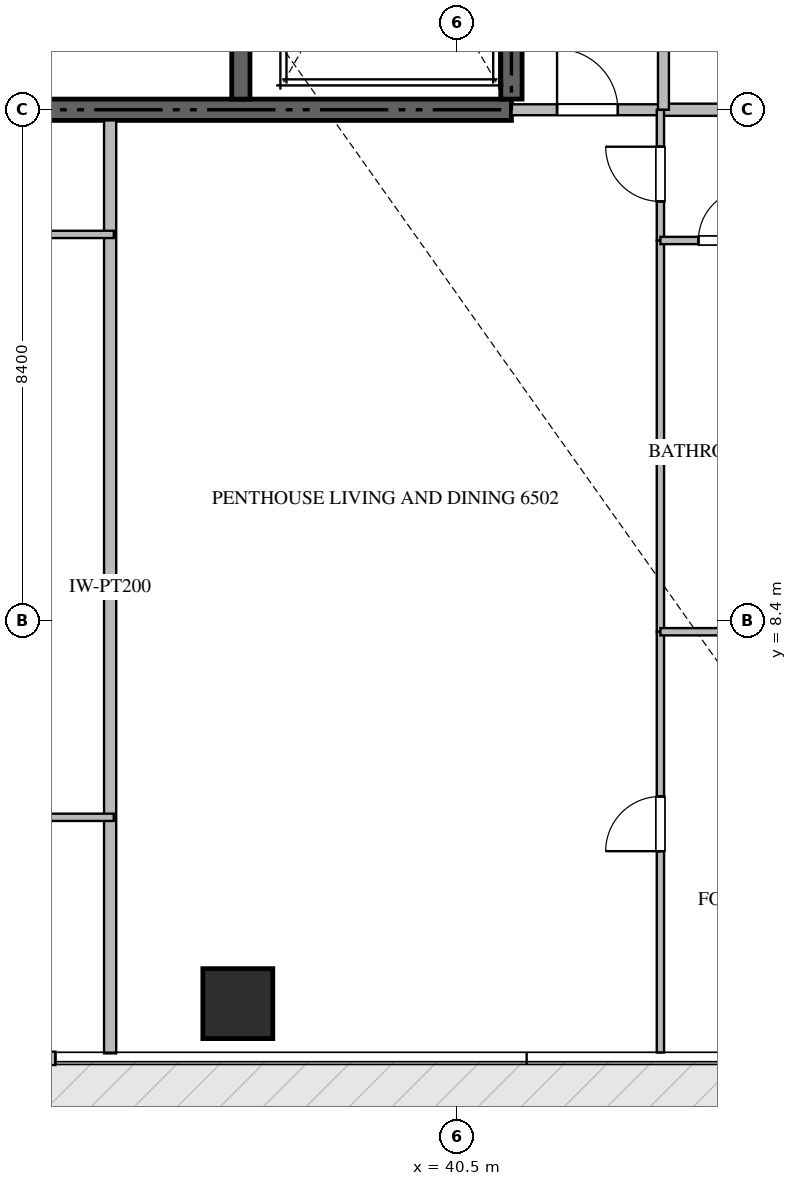
"""IFC4 building model, lengths in metres.
Left out: names, types, materials, properties, quantities, classifications, styles, units other than length and angle.
Written with IfcOpenShell. Run it as: python <this file> out.ifc"""

import sys

from ifc_helpers import new_model, si_unit, direction, frame, frame_2d, origin, origin_2d, place, context, subcontext, project, spatial, rectangle, extrude, source, transform, mapped, element, fill, save


model = new_model("IFC4")
c1 = context("Model", 3, precision=1e-05, world=origin(), true_north=direction((0.0, 1.0)))
c2 = subcontext(c1, "Body", "Model", "MODEL_VIEW")
j1 = project(units=[si_unit("LENGTHUNIT", "METRE"), si_unit("PLANEANGLEUNIT", "RADIAN")], contexts=[c1])
p1 = place(None, origin())
s1 = spatial("IfcSite", under=j1, at=p1, CompositionType="ELEMENT")
p2 = place(p1, origin())
s2 = spatial("IfcBuilding", under=s1, at=p2, CompositionType="ELEMENT")
p3 = place(p2, frame((0.0, 0.0, 260.5)))
s3 = spatial("IfcBuildingStorey", under=s2, at=p3, CompositionType="ELEMENT", Elevation=260.5)
p4 = place(p3, frame((23.4, 16.8, -0.26), z_axis=(0.0, 0.0, 1.0), x_axis=(1.0, 0.0, 0.0)))
e1 = element("IfcWall", 1, at=p4, inside=s3, PredefinedType="SHEAR", context=c2, shape_type="SweptSolid", body=[
    extrude(rectangle(XDim=18.0, YDim=0.35, at=frame_2d((9.0, 0.0))), origin(), (0.0, 0.0, 1.0), 3.848),
])
p5 = place(p3, frame((41.4, 16.975, -0.26), z_axis=(0.0, 0.0, 1.0), x_axis=(0.0, 1.0, 0.0)))
e2 = element("IfcWall", 2, at=p5, inside=s3, PredefinedType="SHEAR", context=c2, shape_type="SweptSolid", body=[
    extrude(rectangle(XDim=8.375, YDim=0.35, at=frame_2d((4.188, 0.0))), origin(), (0.0, 0.0, 1.0), 3.848),
])
p6 = place(p3, frame((36.95, 16.975, -0.26), z_axis=(0.0, 0.0, 1.0), x_axis=(0.0, 1.0, 0.0)))
e3 = element("IfcWall", 3, at=p6, inside=s3, PredefinedType="SHEAR", context=c2, shape_type="SweptSolid", body=[
    extrude(rectangle(XDim=8.375, YDim=0.3, at=frame_2d((4.188, 0.0))), origin(), (0.0, 0.0, 1.0), 3.848),
])
m1 = source(origin(), c2, "Body", "SweptSolid", [
    extrude(rectangle(XDim=1.15, YDim=1.15, at=origin_2d()), origin(), (0.0, 0.0, 1.0), 3.85),
])
p7 = place(p3, frame((36.9, 2.1, -0.26), z_axis=(0.0, 0.0, 1.0), x_axis=(1.0, 0.0, 0.0)))
e4 = element("IfcColumn", 4, at=p7, inside=s3, PredefinedType="COLUMN", context=c2, shape_type="MappedRepresentation", body=[
    mapped(m1, transform((0.0, 0.0, 0.0), scale=1.0)),
])
p8 = place(p3, frame((30.9, 1.2, 0.0), z_axis=(0.0, 0.0, 1.0), x_axis=(1.0, 0.0, 0.0)))
e5 = element("IfcWall", 5, at=p8, inside=s3, PredefinedType="ELEMENTEDWALL", context=c2, shape_type="SweptSolid", body=[
    extrude(rectangle(XDim=3.0, YDim=0.22, at=frame_2d((1.5, 0.0))), origin(), (0.0, 0.0, 1.0), 3.575),
])
p9 = place(p8, frame((0.8, 0.0, 0.0)))
e6 = element("IfcOpeningElement", 6, at=p9, cuts=e5, PredefinedType="OPENING", context=c2, shape_type="SweptSolid", body=[
    extrude(rectangle(XDim=1.4, YDim=2.25, at=frame_2d((0.7, 1.125))), frame((0.0, 0.12, 0.0), z_axis=(0.0, -1.0, 0.0), x_axis=(1.0, 0.0, 0.0)), (0.0, 0.0, 1.0), 0.24),
])
p10 = place(p3, frame((34.8, 1.282, 0.0), z_axis=(0.0, 0.0, 1.0), x_axis=(0.0, 1.0, 0.0)))
e7 = element("IfcWall", 7, at=p10, inside=s3, PredefinedType="PARTITIONING", context=c2, shape_type="SweptSolid", body=[
    extrude(rectangle(XDim=15.343, YDim=0.2, at=frame_2d((7.671, 0.0))), origin(), (0.0, 0.0, 1.0), 3.59),
])
p11 = place(p3, frame((43.9, 16.8, 0.0), z_axis=(0.0, 0.0, 1.0), x_axis=(1.0, 0.0, 0.0)))
e8 = element("IfcWall", 8, at=p11, inside=s3, PredefinedType="PARTITIONING", context=c2, shape_type="SweptSolid", body=[
    extrude(rectangle(XDim=13.418, YDim=0.2, at=frame_2d((6.709, 0.0))), origin(), (0.0, 0.0, 1.0), 3.59),
])
p12 = place(p3, frame((41.402, 16.8, 0.0), z_axis=(0.0, 0.0, 1.0), x_axis=(1.0, 0.0, 0.0)))
e9 = element("IfcWall", 9, at=p12, inside=s3, PredefinedType="PARTITIONING", context=c2, shape_type="SweptSolid", body=[
    extrude(rectangle(XDim=2.496, YDim=0.18, at=frame_2d((1.248, 0.0))), origin(), (0.0, 0.0, 1.0), 3.59),
])
p13 = place(p12, frame((0.748, 0.0, 0.0)))
e10 = element("IfcOpeningElement", 10, at=p13, cuts=e9, PredefinedType="OPENING", context=c2, shape_type="SweptSolid", body=[
    extrude(rectangle(XDim=1.0, YDim=2.15, at=frame_2d((0.5, 1.075))), frame((0.0, 0.1, 0.0), z_axis=(0.0, -1.0, 0.0), x_axis=(1.0, 0.0, 0.0)), (0.0, 0.0, 1.0), 0.2),
])
p14 = place(p3, frame((43.9, 16.8, 0.0), z_axis=(0.0, 0.0, 1.0), x_axis=(0.0, 1.0, 0.0)))
e11 = element("IfcWall", 11, at=p14, inside=s3, PredefinedType="PARTITIONING", context=c2, shape_type="SweptSolid", body=[
    extrude(rectangle(XDim=16.8, YDim=0.18, at=frame_2d((8.4, 0.0))), origin(), (0.0, 0.0, 1.0), 3.59),
])
p15 = place(p14, frame((2.575, 0.0, 0.0)))
e12 = element("IfcOpeningElement", 12, at=p15, cuts=e11, PredefinedType="OPENING", context=c2, shape_type="SweptSolid", body=[
    extrude(rectangle(XDim=1.0, YDim=2.15, at=frame_2d((0.5, 1.075))), frame((0.0, 0.1, 0.0), z_axis=(0.0, -1.0, 0.0), x_axis=(1.0, 0.0, 0.0)), (0.0, 0.0, 1.0), 0.2),
])
p16 = place(p14, frame((10.997, 0.0, 0.0)))
e13 = element("IfcOpeningElement", 13, at=p16, cuts=e11, PredefinedType="OPENING", context=c2, shape_type="SweptSolid", body=[
    extrude(rectangle(XDim=1.0, YDim=2.15, at=frame_2d((0.5, 1.075))), frame((0.0, 0.1, 0.0), z_axis=(0.0, -1.0, 0.0), x_axis=(1.0, 0.0, 0.0)), (0.0, 0.0, 1.0), 0.2),
])
for number, where, z_axis, x_axis in (
    (14, (26.3, 5.164, 0.0), (0.0, 0.0, 1.0), (1.0, 0.0, 0.0)),
    (15, (26.3, 14.75, 0.0), (0.0, 0.0, 1.0), (1.0, 0.0, 0.0)),
):
    element("IfcWall", number, at=place(p3, frame(where, z_axis=z_axis, x_axis=x_axis)), inside=s3, PredefinedType="PARTITIONING", context=c2, shape_type="SweptSolid", body=[
        extrude(rectangle(XDim=8.56, YDim=0.12, at=frame_2d((4.28, 0.0))), origin(), (0.0, 0.0, 1.0), 3.59),
    ])
p17 = place(p3, frame((43.85, 14.65, 0.0), z_axis=(0.0, 0.0, 1.0), x_axis=(0.0, 1.0, 0.0)))
e16 = element("IfcWall", 16, at=p17, inside=s3, PredefinedType="PARTITIONING", context=c2, shape_type="SweptSolid", body=[
    extrude(rectangle(XDim=2.148, YDim=0.12, at=frame_2d((1.074, 0.0))), origin(), (0.0, 0.0, 1.0), 3.59),
])
p18 = place(p17, frame((0.642, 0.0, 0.0)))
e17 = element("IfcOpeningElement", 17, at=p18, cuts=e16, PredefinedType="OPENING", context=c2, shape_type="SweptSolid", body=[
    extrude(rectangle(XDim=0.9, YDim=2.1, at=frame_2d((0.45, 1.05))), frame((0.0, 0.07, 0.0), z_axis=(0.0, -1.0, 0.0), x_axis=(1.0, 0.0, 0.0)), (0.0, 0.0, 1.0), 0.14),
])
p19 = place(p3, frame((43.85, 1.295, 0.0), z_axis=(0.0, 0.0, 1.0), x_axis=(0.0, 1.0, 0.0)))
e18 = element("IfcWall", 18, at=p19, inside=s3, PredefinedType="PARTITIONING", context=c2, shape_type="SweptSolid", body=[
    extrude(rectangle(XDim=6.921, YDim=0.12, at=frame_2d((3.46, 0.0))), origin(), (0.0, 0.0, 1.0), 3.59),
])
p20 = place(p19, frame((3.312, 0.0, 0.0)))
e19 = element("IfcOpeningElement", 19, at=p20, cuts=e18, PredefinedType="OPENING", context=c2, shape_type="SweptSolid", body=[
    extrude(rectangle(XDim=0.9, YDim=2.1, at=frame_2d((0.45, 1.05))), frame((0.0, 0.07, 0.0), z_axis=(0.0, -1.0, 0.0), x_axis=(1.0, 0.0, 0.0)), (0.0, 0.0, 1.0), 0.14),
])
p21 = place(p3, frame((43.85, 8.218, 0.0), z_axis=(0.0, 0.0, 1.0), x_axis=(0.0, 1.0, 0.0)))
e20 = element("IfcWall", 20, at=p21, inside=s3, PredefinedType="PARTITIONING", context=c2, shape_type="SweptSolid", body=[
    extrude(rectangle(XDim=6.43, YDim=0.12, at=frame_2d((3.215, 0.0))), origin(), (0.0, 0.0, 1.0), 3.59),
])
p22 = place(p3, frame((43.85, 8.216, 0.0), z_axis=(0.0, 0.0, 1.0), x_axis=(1.0, 0.0, 0.0)))
e21 = element("IfcWall", 21, at=p22, inside=s3, PredefinedType="PARTITIONING", context=c2, shape_type="SweptSolid", body=[
    extrude(rectangle(XDim=5.1, YDim=0.12, at=frame_2d((2.55, 0.0))), origin(), (0.0, 0.0, 1.0), 3.59),
])
p23 = place(p3, frame((43.85, 14.65, 0.0), z_axis=(0.0, 0.0, 1.0), x_axis=(1.0, 0.0, 0.0)))
e22 = element("IfcWall", 22, at=p23, inside=s3, PredefinedType="PARTITIONING", context=c2, shape_type="SweptSolid", body=[
    extrude(rectangle(XDim=2.1, YDim=0.12, at=frame_2d((1.05, 0.0))), origin(), (0.0, 0.0, 1.0), 3.59),
])
p24 = place(p23, frame((0.625, 0.0, 0.0)))
e23 = element("IfcOpeningElement", 23, at=p24, cuts=e22, PredefinedType="OPENING", context=c2, shape_type="SweptSolid", body=[
    extrude(rectangle(XDim=0.85, YDim=2.1, at=frame_2d((0.425, 1.05))), frame((0.0, 0.07, 0.0), z_axis=(0.0, -1.0, 0.0), x_axis=(1.0, 0.0, 0.0)), (0.0, 0.0, 1.0), 0.14),
])
m2 = source(origin(), c2, "Body", "SweptSolid", [
    extrude(rectangle(XDim=1.0, YDim=2.15, at=frame_2d((0.5, 1.075))), frame((0.0, 0.025, 0.0), z_axis=(0.0, -1.0, 0.0), x_axis=(1.0, 0.0, 0.0)), (0.0, 0.0, 1.0), 0.05),
])
p25 = place(p13, origin())
e24 = element("IfcDoor", 24, at=p25, inside=s3, OperationType="SINGLE_SWING_LEFT", PredefinedType="DOOR", context=c2, shape_type="MappedRepresentation", body=[
    mapped(m2, transform((0.0, 0.0, 0.0), scale=1.0)),
])
fill(e10, e24)
m3 = source(origin(), c2, "Body", "SweptSolid", [
    extrude(rectangle(XDim=0.9, YDim=2.1, at=frame_2d((0.45, 1.05))), frame((0.0, 0.025, 0.0), z_axis=(0.0, -1.0, 0.0), x_axis=(1.0, 0.0, 0.0)), (0.0, 0.0, 1.0), 0.05),
])
p26 = place(p18, origin())
e25 = element("IfcDoor", 25, at=p26, inside=s3, OperationType="SINGLE_SWING_RIGHT", PredefinedType="DOOR", context=c2, shape_type="MappedRepresentation", body=[
    mapped(m3, transform((0.0, 0.0, 0.0), scale=1.0)),
])
fill(e17, e25)
p27 = place(p20, origin())
e26 = element("IfcDoor", 26, at=p27, inside=s3, OperationType="SINGLE_SWING_LEFT", PredefinedType="DOOR", context=c2, shape_type="MappedRepresentation", body=[
    mapped(m3, transform((0.0, 0.0, 0.0), scale=1.0)),
])
fill(e19, e26)
m4 = source(origin(), c2, "Body", "SweptSolid", [
    extrude(rectangle(XDim=0.85, YDim=2.1, at=frame_2d((0.425, 1.05))), frame((0.0, 0.025, 0.0), z_axis=(0.0, -1.0, 0.0), x_axis=(1.0, 0.0, 0.0)), (0.0, 0.0, 1.0), 0.05),
])
p28 = place(p24, origin())
e27 = element("IfcDoor", 27, at=p28, inside=s3, OperationType="SINGLE_SWING_RIGHT", PredefinedType="DOOR", context=c2, shape_type="MappedRepresentation", body=[
    mapped(m4, transform((0.0, 0.0, 0.0), scale=1.0)),
])
fill(e23, e27)
save(model, sys.argv[1])
